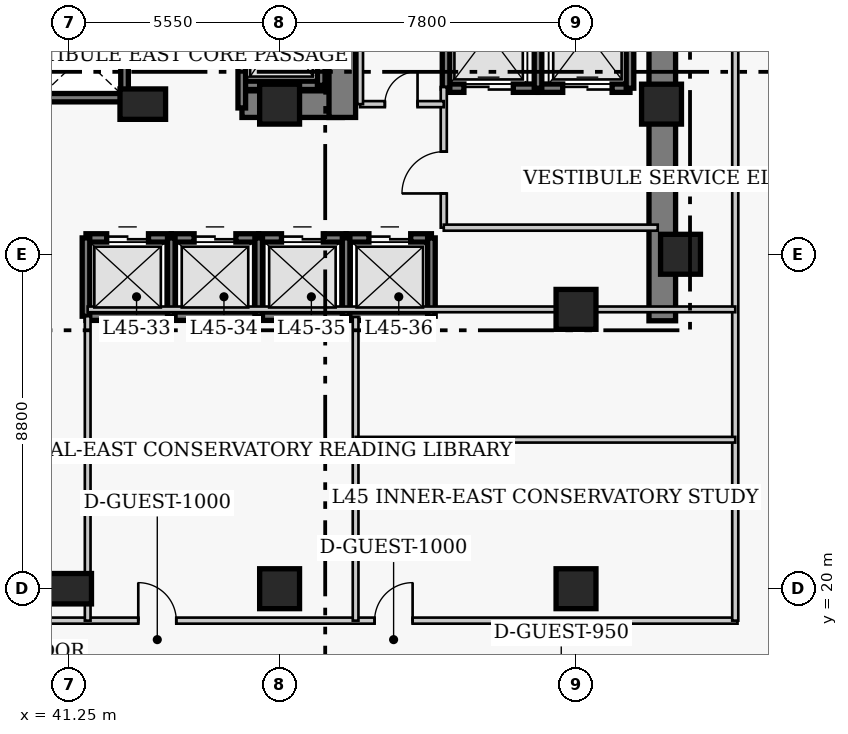
"""IFC4 building model, lengths in metres.
Left out: names, types, materials, properties, quantities, classifications, styles, units other than length and angle.
Written with IfcOpenShell. Run it as: python <this file> out.ifc"""

import sys

from ifc_helpers import new_model, si_unit, direction, frame, frame_2d, origin, origin_2d, place, context, subcontext, project, spatial, rectangle, extrude, element, fill, save


model = new_model("IFC4")
c1 = context("Model", 3, precision=1e-05, world=origin(), true_north=direction((0.0, 1.0)))
c2 = subcontext(c1, "Body", "Model", "MODEL_VIEW")
j1 = project(units=[si_unit("LENGTHUNIT", "METRE"), si_unit("PLANEANGLEUNIT", "RADIAN")], contexts=[c1])
p1 = place(None, origin())
s1 = spatial("IfcSite", under=j1, at=p1, CompositionType="ELEMENT")
p2 = place(p1, origin())
s2 = spatial("IfcBuilding", under=s1, at=p2, CompositionType="ELEMENT")
p3 = place(p2, frame((0.0, 0.0, 180.2)))
s3 = spatial("IfcBuildingStorey", under=s2, at=p3, CompositionType="ELEMENT", Elevation=180.2)
p4 = place(p3, frame((56.87, 27.05, 0.0), z_axis=(0.0, 0.0, 1.0), x_axis=(0.0, 1.0, 0.0)))
e1 = element("IfcWall", 1, at=p4, inside=s3, PredefinedType="SHEAR", context=c2, shape_type="SweptSolid", body=[
    extrude(rectangle(XDim=13.62, YDim=0.7, at=frame_2d((6.81, 0.0))), origin(), (0.0, 0.0, 1.0), 3.8),
])
p5 = place(p3, frame((45.81, 32.75, 0.0), z_axis=(0.0, 0.0, 1.0), x_axis=(1.0, 0.0, 0.0)))
e2 = element("IfcWall", 2, at=p5, inside=s3, PredefinedType="SHEAR", context=c2, shape_type="SweptSolid", body=[
    extrude(rectangle(XDim=2.64, YDim=0.7, at=frame_2d((1.32, 0.0))), origin(), (0.0, 0.0, 1.0), 3.8),
])
p6 = place(p3, frame((48.45, 32.4, 0.0), z_axis=(0.0, 0.0, 1.0), x_axis=(0.0, 1.0, 0.0)))
e3 = element("IfcWall", 3, at=p6, inside=s3, PredefinedType="SHEAR", context=c2, shape_type="SweptSolid", body=[
    extrude(rectangle(XDim=7.92, YDim=0.7, at=frame_2d((3.96, 0.0))), origin(), (0.0, 0.0, 1.0), 3.8),
])
p7 = place(p6, frame((5.8, 0.0, 0.0)))
e4 = element("IfcOpeningElement", 4, at=p7, cuts=e3, PredefinedType="OPENING", context=c2, shape_type="SweptSolid", body=[
    extrude(rectangle(XDim=1.1, YDim=2.15, at=frame_2d((0.55, 1.075))), frame((0.0, 0.36, 0.0), z_axis=(0.0, -1.0, 0.0), x_axis=(1.0, 0.0, 0.0)), (0.0, 0.0, 1.0), 0.72),
])
p8 = place(p3, frame((41.25, 20.0, 0.0), z_axis=(0.0, 0.0, 1.0), x_axis=(1.0, 0.0, 0.0)))
e5 = element("IfcColumn", 5, at=p8, inside=s3, PredefinedType="COLUMN", context=c2, shape_type="SweptSolid", body=[
    extrude(rectangle(XDim=1.2, YDim=0.8, at=origin_2d()), origin(), (0.0, 0.0, 1.0), 3.8),
])
for number, where, z_axis, x_axis in (
    (6, (46.8, 20.0, 0.0), (0.0, 0.0, 1.0), (1.0, 0.0, 0.0)),
    (7, (54.6, 20.0, 0.0), (0.0, 0.0, 1.0), (1.0, 0.0, 0.0)),
    (8, (57.35, 28.8, 0.0), (0.0, 0.0, 1.0), (1.0, 0.0, 0.0)),
):
    element("IfcColumn", number, at=place(p3, frame(where, z_axis=z_axis, x_axis=x_axis)), inside=s3, PredefinedType="COLUMN", context=c2, shape_type="SweptSolid", body=[
        extrude(rectangle(XDim=1.05, YDim=1.05, at=origin_2d()), origin(), (0.0, 0.0, 1.0), 3.8),
    ])
p9 = place(p3, frame((43.2, 32.75, 0.0), z_axis=(0.0, 0.0, 1.0), x_axis=(1.0, 0.0, 0.0)))
e9 = element("IfcColumn", 9, at=p9, inside=s3, PredefinedType="COLUMN", context=c2, shape_type="SweptSolid", body=[
    extrude(rectangle(XDim=1.2, YDim=0.8, at=origin_2d()), origin(), (0.0, 0.0, 1.0), 3.8),
])
for number, where, z_axis, x_axis in (
    (10, (46.8, 32.75, 0.0), (0.0, 0.0, 1.0), (1.0, 0.0, 0.0)),
    (11, (54.6, 27.35, 0.0), (0.0, 0.0, 1.0), (1.0, 0.0, 0.0)),
    (12, (56.85, 32.75, 0.0), (0.0, 0.0, 1.0), (1.0, 0.0, 0.0)),
):
    element("IfcColumn", number, at=place(p3, frame(where, z_axis=z_axis, x_axis=x_axis)), inside=s3, PredefinedType="COLUMN", context=c2, shape_type="SweptSolid", body=[
        extrude(rectangle(XDim=1.05, YDim=1.05, at=origin_2d()), origin(), (0.0, 0.0, 1.0), 3.8),
    ])
p10 = place(p3, frame((41.705, 29.23, 0.0), z_axis=(0.0, 0.0, 1.0), x_axis=(1.0, 0.0, 0.0)))
e13 = element("IfcWall", 13, at=p10, inside=s3, PredefinedType="SHEAR", context=c2, shape_type="SweptSolid", body=[
    extrude(rectangle(XDim=2.245, YDim=0.22, at=frame_2d((1.123, 0.0))), origin(), (0.0, 0.0, 1.0), 3.8),
])
p11 = place(p10, frame((0.545, 0.0, 0.0)))
e14 = element("IfcOpeningElement", 14, at=p11, cuts=e13, PredefinedType="OPENING", context=c2, shape_type="SweptSolid", body=[
    extrude(rectangle(XDim=1.1, YDim=2.15, at=frame_2d((0.55, 1.075))), frame((0.0, 0.12, 0.0), z_axis=(0.0, -1.0, 0.0), x_axis=(1.0, 0.0, 0.0)), (0.0, 0.0, 1.0), 0.24),
])
p12 = place(p3, frame((41.705, 27.17, 0.0), z_axis=(0.0, 0.0, 1.0), x_axis=(1.0, 0.0, 0.0)))
e15 = element("IfcWall", 15, at=p12, inside=s3, PredefinedType="SHEAR", context=c2, shape_type="SweptSolid", body=[
    extrude(rectangle(XDim=2.245, YDim=0.22, at=frame_2d((1.123, 0.0))), origin(), (0.0, 0.0, 1.0), 3.8),
])
p13 = place(p3, frame((41.705, 27.17, 0.0), z_axis=(0.0, 0.0, 1.0), x_axis=(0.0, 1.0, 0.0)))
e16 = element("IfcWall", 16, at=p13, inside=s3, PredefinedType="SHEAR", context=c2, shape_type="SweptSolid", body=[
    extrude(rectangle(XDim=2.06, YDim=0.2, at=frame_2d((1.03, 0.0))), origin(), (0.0, 0.0, 1.0), 3.8),
])
p14 = place(p3, frame((43.95, 29.23, 0.0), z_axis=(0.0, 0.0, 1.0), x_axis=(1.0, 0.0, 0.0)))
e17 = element("IfcWall", 17, at=p14, inside=s3, PredefinedType="SHEAR", context=c2, shape_type="SweptSolid", body=[
    extrude(rectangle(XDim=2.3, YDim=0.22, at=frame_2d((1.15, 0.0))), origin(), (0.0, 0.0, 1.0), 3.8),
])
p15 = place(p14, frame((0.6, 0.0, 0.0)))
e18 = element("IfcOpeningElement", 18, at=p15, cuts=e17, PredefinedType="OPENING", context=c2, shape_type="SweptSolid", body=[
    extrude(rectangle(XDim=1.1, YDim=2.15, at=frame_2d((0.55, 1.075))), frame((0.0, 0.12, 0.0), z_axis=(0.0, -1.0, 0.0), x_axis=(1.0, 0.0, 0.0)), (0.0, 0.0, 1.0), 0.24),
])
p16 = place(p3, frame((43.95, 27.17, 0.0), z_axis=(0.0, 0.0, 1.0), x_axis=(1.0, 0.0, 0.0)))
e19 = element("IfcWall", 19, at=p16, inside=s3, PredefinedType="SHEAR", context=c2, shape_type="SweptSolid", body=[
    extrude(rectangle(XDim=2.3, YDim=0.22, at=frame_2d((1.15, 0.0))), origin(), (0.0, 0.0, 1.0), 3.8),
])
p17 = place(p3, frame((43.95, 27.17, 0.0), z_axis=(0.0, 0.0, 1.0), x_axis=(0.0, 1.0, 0.0)))
e20 = element("IfcWall", 20, at=p17, inside=s3, PredefinedType="SHEAR", context=c2, shape_type="SweptSolid", body=[
    extrude(rectangle(XDim=2.06, YDim=0.2, at=frame_2d((1.03, 0.0))), origin(), (0.0, 0.0, 1.0), 3.8),
])
p18 = place(p3, frame((46.25, 29.23, 0.0), z_axis=(0.0, 0.0, 1.0), x_axis=(1.0, 0.0, 0.0)))
e21 = element("IfcWall", 21, at=p18, inside=s3, PredefinedType="SHEAR", context=c2, shape_type="SweptSolid", body=[
    extrude(rectangle(XDim=2.3, YDim=0.22, at=frame_2d((1.15, 0.0))), origin(), (0.0, 0.0, 1.0), 3.8),
])
p19 = place(p18, frame((0.6, 0.0, 0.0)))
e22 = element("IfcOpeningElement", 22, at=p19, cuts=e21, PredefinedType="OPENING", context=c2, shape_type="SweptSolid", body=[
    extrude(rectangle(XDim=1.1, YDim=2.15, at=frame_2d((0.55, 1.075))), frame((0.0, 0.12, 0.0), z_axis=(0.0, -1.0, 0.0), x_axis=(1.0, 0.0, 0.0)), (0.0, 0.0, 1.0), 0.24),
])
p20 = place(p3, frame((46.25, 27.17, 0.0), z_axis=(0.0, 0.0, 1.0), x_axis=(1.0, 0.0, 0.0)))
e23 = element("IfcWall", 23, at=p20, inside=s3, PredefinedType="SHEAR", context=c2, shape_type="SweptSolid", body=[
    extrude(rectangle(XDim=2.3, YDim=0.22, at=frame_2d((1.15, 0.0))), origin(), (0.0, 0.0, 1.0), 3.8),
])
p21 = place(p3, frame((46.25, 27.17, 0.0), z_axis=(0.0, 0.0, 1.0), x_axis=(0.0, 1.0, 0.0)))
e24 = element("IfcWall", 24, at=p21, inside=s3, PredefinedType="SHEAR", context=c2, shape_type="SweptSolid", body=[
    extrude(rectangle(XDim=2.06, YDim=0.2, at=frame_2d((1.03, 0.0))), origin(), (0.0, 0.0, 1.0), 3.8),
])
p22 = place(p3, frame((48.55, 29.23, 0.0), z_axis=(0.0, 0.0, 1.0), x_axis=(1.0, 0.0, 0.0)))
e25 = element("IfcWall", 25, at=p22, inside=s3, PredefinedType="SHEAR", context=c2, shape_type="SweptSolid", body=[
    extrude(rectangle(XDim=2.245, YDim=0.22, at=frame_2d((1.123, 0.0))), origin(), (0.0, 0.0, 1.0), 3.8),
])
p23 = place(p22, frame((0.6, 0.0, 0.0)))
e26 = element("IfcOpeningElement", 26, at=p23, cuts=e25, PredefinedType="OPENING", context=c2, shape_type="SweptSolid", body=[
    extrude(rectangle(XDim=1.1, YDim=2.15, at=frame_2d((0.55, 1.075))), frame((0.0, 0.12, 0.0), z_axis=(0.0, -1.0, 0.0), x_axis=(1.0, 0.0, 0.0)), (0.0, 0.0, 1.0), 0.24),
])
p24 = place(p3, frame((48.55, 27.17, 0.0), z_axis=(0.0, 0.0, 1.0), x_axis=(1.0, 0.0, 0.0)))
e27 = element("IfcWall", 27, at=p24, inside=s3, PredefinedType="SHEAR", context=c2, shape_type="SweptSolid", body=[
    extrude(rectangle(XDim=2.245, YDim=0.22, at=frame_2d((1.123, 0.0))), origin(), (0.0, 0.0, 1.0), 3.8),
])
for number, where, z_axis, x_axis in (
    (28, (48.55, 27.17, 0.0), (0.0, 0.0, 1.0), (0.0, 1.0, 0.0)),
    (29, (50.795, 27.17, 0.0), (0.0, 0.0, 1.0), (0.0, 1.0, 0.0)),
):
    element("IfcWall", number, at=place(p3, frame(where, z_axis=z_axis, x_axis=x_axis)), inside=s3, PredefinedType="SHEAR", context=c2, shape_type="SweptSolid", body=[
        extrude(rectangle(XDim=2.06, YDim=0.2, at=frame_2d((1.03, 0.0))), origin(), (0.0, 0.0, 1.0), 3.8),
    ])
p25 = place(p3, frame((40.4, 32.92, 0.0), z_axis=(0.0, 0.0, 1.0), x_axis=(1.0, 0.0, 0.0)))
e30 = element("IfcWall", 30, at=p25, inside=s3, PredefinedType="SHEAR", context=c2, shape_type="SweptSolid", body=[
    extrude(rectangle(XDim=2.32, YDim=0.22, at=frame_2d((1.16, 0.0))), origin(), (0.0, 0.0, 1.0), 3.8),
])
p26 = place(p3, frame((42.72, 32.92, 0.0), z_axis=(0.0, 0.0, 1.0), x_axis=(0.0, 1.0, 0.0)))
e31 = element("IfcWall", 31, at=p26, inside=s3, PredefinedType="SHEAR", context=c2, shape_type="SweptSolid", body=[
    extrude(rectangle(XDim=2.16, YDim=0.2, at=frame_2d((1.08, 0.0))), origin(), (0.0, 0.0, 1.0), 3.8),
])
p27 = place(p3, frame((51.18, 33.17, 0.0), z_axis=(0.0, 0.0, 1.0), x_axis=(1.0, 0.0, 0.0)))
e32 = element("IfcWall", 32, at=p27, inside=s3, PredefinedType="SHEAR", context=c2, shape_type="SweptSolid", body=[
    extrude(rectangle(XDim=2.42, YDim=0.22, at=frame_2d((1.21, 0.0))), origin(), (0.0, 0.0, 1.0), 3.8),
])
p28 = place(p27, frame((0.47, 0.0, 0.0)))
e33 = element("IfcOpeningElement", 33, at=p28, cuts=e32, PredefinedType="OPENING", context=c2, shape_type="SweptSolid", body=[
    extrude(rectangle(XDim=1.3, YDim=2.15, at=frame_2d((0.65, 1.075))), frame((0.0, 0.12, 0.0), z_axis=(0.0, -1.0, 0.0), x_axis=(1.0, 0.0, 0.0)), (0.0, 0.0, 1.0), 0.24),
])
p29 = place(p3, frame((51.18, 33.17, 0.0), z_axis=(0.0, 0.0, 1.0), x_axis=(0.0, 1.0, 0.0)))
e34 = element("IfcWall", 34, at=p29, inside=s3, PredefinedType="SHEAR", context=c2, shape_type="SweptSolid", body=[
    extrude(rectangle(XDim=2.86, YDim=0.2, at=frame_2d((1.43, 0.0))), origin(), (0.0, 0.0, 1.0), 3.8),
])
p30 = place(p3, frame((53.6, 33.17, 0.0), z_axis=(0.0, 0.0, 1.0), x_axis=(1.0, 0.0, 0.0)))
e35 = element("IfcWall", 35, at=p30, inside=s3, PredefinedType="SHEAR", context=c2, shape_type="SweptSolid", body=[
    extrude(rectangle(XDim=2.42, YDim=0.22, at=frame_2d((1.21, 0.0))), origin(), (0.0, 0.0, 1.0), 3.8),
])
p31 = place(p30, frame((0.65, 0.0, 0.0)))
e36 = element("IfcOpeningElement", 36, at=p31, cuts=e35, PredefinedType="OPENING", context=c2, shape_type="SweptSolid", body=[
    extrude(rectangle(XDim=1.3, YDim=2.15, at=frame_2d((0.65, 1.075))), frame((0.0, 0.12, 0.0), z_axis=(0.0, -1.0, 0.0), x_axis=(1.0, 0.0, 0.0)), (0.0, 0.0, 1.0), 0.24),
])
for number, where, z_axis, x_axis in (
    (37, (53.6, 33.17, 0.0), (0.0, 0.0, 1.0), (0.0, 1.0, 0.0)),
    (38, (56.02, 33.17, 0.0), (0.0, 0.0, 1.0), (0.0, 1.0, 0.0)),
):
    element("IfcWall", number, at=place(p3, frame(where, z_axis=z_axis, x_axis=x_axis)), inside=s3, PredefinedType="SHEAR", context=c2, shape_type="SweptSolid", body=[
        extrude(rectangle(XDim=2.86, YDim=0.2, at=frame_2d((1.43, 0.0))), origin(), (0.0, 0.0, 1.0), 3.8),
    ])
p32 = place(p3, frame((45.805, 33.245, 0.0), z_axis=(0.0, 0.0, 1.0), x_axis=(1.0, 0.0, 0.0)))
e39 = element("IfcWall", 39, at=p32, inside=s3, PredefinedType="SHEAR", context=c2, shape_type="SweptSolid", body=[
    extrude(rectangle(XDim=2.09, YDim=0.22, at=frame_2d((1.045, 0.0))), origin(), (0.0, 0.0, 1.0), 3.8),
])
p33 = place(p3, frame((45.805, 32.65, 0.0), z_axis=(0.0, 0.0, 1.0), x_axis=(0.0, 1.0, 0.0)))
e40 = element("IfcWall", 40, at=p33, inside=s3, PredefinedType="SHEAR", context=c2, shape_type="SweptSolid", body=[
    extrude(rectangle(XDim=3.505, YDim=0.2, at=frame_2d((1.752, 0.0))), origin(), (0.0, 0.0, 1.0), 3.8),
])
p34 = place(p3, frame((47.895, 33.245, 0.0), z_axis=(0.0, 0.0, 1.0), x_axis=(0.0, 1.0, 0.0)))
e41 = element("IfcWall", 41, at=p34, inside=s3, PredefinedType="SHEAR", context=c2, shape_type="SweptSolid", body=[
    extrude(rectangle(XDim=2.91, YDim=0.2, at=frame_2d((1.455, 0.0))), origin(), (0.0, 0.0, 1.0), 3.8),
])
p35 = place(p3, frame((51.12, 29.5, 0.0), z_axis=(0.0, 0.0, 1.0), x_axis=(0.0, 1.0, 0.0)))
e42 = element("IfcWall", 42, at=p35, inside=s3, PredefinedType="PARTITIONING", context=c2, shape_type="SweptSolid", body=[
    extrude(rectangle(XDim=3.7, YDim=0.16, at=frame_2d((1.85, 0.0))), origin(), (0.0, 0.0, 1.0), 3.42),
])
p36 = place(p35, frame((0.9, 0.0, 0.0)))
e43 = element("IfcOpeningElement", 43, at=p36, cuts=e42, PredefinedType="OPENING", context=c2, shape_type="SweptSolid", body=[
    extrude(rectangle(XDim=1.1, YDim=2.15, at=frame_2d((0.55, 1.075))), frame((0.0, 0.09, 0.0), z_axis=(0.0, -1.0, 0.0), x_axis=(1.0, 0.0, 0.0)), (0.0, 0.0, 1.0), 0.18),
])
p37 = place(p3, frame((51.12, 29.5, 0.0), z_axis=(0.0, 0.0, 1.0), x_axis=(1.0, 0.0, 0.0)))
e44 = element("IfcWall", 44, at=p37, inside=s3, PredefinedType="PARTITIONING", context=c2, shape_type="SweptSolid", body=[
    extrude(rectangle(XDim=5.63, YDim=0.16, at=frame_2d((2.815, 0.0))), origin(), (0.0, 0.0, 1.0), 3.42),
])
p38 = place(p3, frame((48.92, 32.75, 0.0), z_axis=(0.0, 0.0, 1.0), x_axis=(1.0, 0.0, 0.0)))
e45 = element("IfcWall", 45, at=p38, inside=s3, PredefinedType="PARTITIONING", context=c2, shape_type="SweptSolid", body=[
    extrude(rectangle(XDim=2.2, YDim=0.16, at=frame_2d((1.1, 0.0))), origin(), (0.0, 0.0, 1.0), 3.42),
])
p39 = place(p38, frame((0.65, 0.0, 0.0)))
e46 = element("IfcOpeningElement", 46, at=p39, cuts=e45, PredefinedType="OPENING", context=c2, shape_type="SweptSolid", body=[
    extrude(rectangle(XDim=0.86, YDim=2.05, at=frame_2d((0.43, 1.025))), frame((0.0, 0.09, 0.0), z_axis=(0.0, -1.0, 0.0), x_axis=(1.0, 0.0, 0.0)), (0.0, 0.0, 1.0), 0.18),
])
p40 = place(p3, frame((48.92, 32.75, 0.0), z_axis=(0.0, 0.0, 1.0), x_axis=(0.0, 1.0, 0.0)))
e47 = element("IfcWall", 47, at=p40, inside=s3, PredefinedType="PARTITIONING", context=c2, shape_type="SweptSolid", body=[
    extrude(rectangle(XDim=3.62, YDim=0.15, at=frame_2d((1.81, 0.0))), origin(), (0.0, 0.0, 1.0), 3.42),
])
p41 = place(p3, frame((35.85, 19.16, 0.0), z_axis=(0.0, 0.0, 1.0), x_axis=(1.0, 0.0, 0.0)))
e48 = element("IfcWall", 48, at=p41, inside=s3, PredefinedType="PARTITIONING", context=c2, shape_type="SweptSolid", body=[
    extrude(rectangle(XDim=23.0, YDim=0.16, at=frame_2d((11.5, 0.0))), origin(), (0.0, 0.0, 1.0), 3.42),
])
p42 = place(p41, frame((7.231, 0.0, 0.0)))
e49 = element("IfcOpeningElement", 49, at=p42, cuts=e48, PredefinedType="OPENING", context=c2, shape_type="SweptSolid", body=[
    extrude(rectangle(XDim=1.0, YDim=2.15, at=frame_2d((0.5, 1.075))), frame((0.0, 0.09, 0.0), z_axis=(0.0, -1.0, 0.0), x_axis=(1.0, 0.0, 0.0)), (0.0, 0.0, 1.0), 0.18),
])
p43 = place(p41, frame((13.45, 0.0, 0.0)))
e50 = element("IfcOpeningElement", 50, at=p43, cuts=e48, PredefinedType="OPENING", context=c2, shape_type="SweptSolid", body=[
    extrude(rectangle(XDim=1.0, YDim=2.15, at=frame_2d((0.5, 1.075))), frame((0.0, 0.09, 0.0), z_axis=(0.0, -1.0, 0.0), x_axis=(1.0, 0.0, 0.0)), (0.0, 0.0, 1.0), 0.18),
])
p44 = place(p3, frame((58.79, 19.16, 0.0), z_axis=(0.0, 0.0, 1.0), x_axis=(0.0, 1.0, 0.0)))
e51 = element("IfcWall", 51, at=p44, inside=s3, PredefinedType="PARTITIONING", context=c2, shape_type="SweptSolid", body=[
    extrude(rectangle(XDim=21.49, YDim=0.16, at=frame_2d((10.745, 0.0))), origin(), (0.0, 0.0, 1.0), 3.42),
])
p45 = place(p3, frame((41.75, 19.16, 0.0), z_axis=(0.0, 0.0, 1.0), x_axis=(0.0, 1.0, 0.0)))
e52 = element("IfcWall", 52, at=p45, inside=s3, PredefinedType="PARTITIONING", context=c2, shape_type="SweptSolid", body=[
    extrude(rectangle(XDim=8.01, YDim=0.15, at=frame_2d((4.005, 0.0))), origin(), (0.0, 0.0, 1.0), 3.42),
])
p46 = place(p3, frame((48.8, 19.16, 0.0), z_axis=(0.0, 0.0, 1.0), x_axis=(0.0, 1.0, 0.0)))
e53 = element("IfcWall", 53, at=p46, inside=s3, PredefinedType="PARTITIONING", context=c2, shape_type="SweptSolid", body=[
    extrude(rectangle(XDim=7.99, YDim=0.15, at=frame_2d((3.995, 0.0))), origin(), (0.0, 0.0, 1.0), 3.42),
])
p47 = place(p3, frame((41.75, 27.35, 0.0), z_axis=(0.0, 0.0, 1.0), x_axis=(1.0, 0.0, 0.0)))
e54 = element("IfcWall", 54, at=p47, inside=s3, PredefinedType="PARTITIONING", context=c2, shape_type="SweptSolid", body=[
    extrude(rectangle(XDim=17.04, YDim=0.15, at=frame_2d((8.52, 0.0))), origin(), (0.0, 0.0, 1.0), 3.42),
])
p48 = place(p3, frame((48.8, 23.92, 0.0), z_axis=(0.0, 0.0, 1.0), x_axis=(1.0, 0.0, 0.0)))
e55 = element("IfcWall", 55, at=p48, inside=s3, PredefinedType="PARTITIONING", context=c2, shape_type="SweptSolid", body=[
    extrude(rectangle(XDim=9.99, YDim=0.15, at=frame_2d((4.995, 0.0))), origin(), (0.0, 0.0, 1.0), 3.42),
])
p49 = place(p11, origin())
e56 = element("IfcDoor", 56, at=p49, inside=s3, OperationType="DOUBLE_DOOR_SLIDING", PredefinedType="DOOR", context=c2, shape_type="SweptSolid", body=[
    extrude(rectangle(XDim=1.1, YDim=2.15, at=frame_2d((0.55, 1.075))), frame((0.0, 0.025, 0.0), z_axis=(0.0, -1.0, 0.0), x_axis=(1.0, 0.0, 0.0)), (0.0, 0.0, 1.0), 0.05),
])
fill(e14, e56)
p50 = place(p15, origin())
e57 = element("IfcDoor", 57, at=p50, inside=s3, OperationType="DOUBLE_DOOR_SLIDING", PredefinedType="DOOR", context=c2, shape_type="SweptSolid", body=[
    extrude(rectangle(XDim=1.1, YDim=2.15, at=frame_2d((0.55, 1.075))), frame((0.0, 0.025, 0.0), z_axis=(0.0, -1.0, 0.0), x_axis=(1.0, 0.0, 0.0)), (0.0, 0.0, 1.0), 0.05),
])
fill(e18, e57)
p51 = place(p19, origin())
e58 = element("IfcDoor", 58, at=p51, inside=s3, OperationType="DOUBLE_DOOR_SLIDING", PredefinedType="DOOR", context=c2, shape_type="SweptSolid", body=[
    extrude(rectangle(XDim=1.1, YDim=2.15, at=frame_2d((0.55, 1.075))), frame((0.0, 0.025, 0.0), z_axis=(0.0, -1.0, 0.0), x_axis=(1.0, 0.0, 0.0)), (0.0, 0.0, 1.0), 0.05),
])
fill(e22, e58)
p52 = place(p23, origin())
e59 = element("IfcDoor", 59, at=p52, inside=s3, OperationType="DOUBLE_DOOR_SLIDING", PredefinedType="DOOR", context=c2, shape_type="SweptSolid", body=[
    extrude(rectangle(XDim=1.1, YDim=2.15, at=frame_2d((0.55, 1.075))), frame((0.0, 0.025, 0.0), z_axis=(0.0, -1.0, 0.0), x_axis=(1.0, 0.0, 0.0)), (0.0, 0.0, 1.0), 0.05),
])
fill(e26, e59)
p53 = place(p28, origin())
e60 = element("IfcDoor", 60, at=p53, inside=s3, OperationType="DOUBLE_DOOR_SLIDING", PredefinedType="DOOR", context=c2, shape_type="SweptSolid", body=[
    extrude(rectangle(XDim=1.3, YDim=2.15, at=frame_2d((0.65, 1.075))), frame((0.0, 0.025, 0.0), z_axis=(0.0, -1.0, 0.0), x_axis=(1.0, 0.0, 0.0)), (0.0, 0.0, 1.0), 0.05),
])
fill(e33, e60)
p54 = place(p31, origin())
e61 = element("IfcDoor", 61, at=p54, inside=s3, OperationType="DOUBLE_DOOR_SLIDING", PredefinedType="DOOR", context=c2, shape_type="SweptSolid", body=[
    extrude(rectangle(XDim=1.3, YDim=2.15, at=frame_2d((0.65, 1.075))), frame((0.0, 0.025, 0.0), z_axis=(0.0, -1.0, 0.0), x_axis=(1.0, 0.0, 0.0)), (0.0, 0.0, 1.0), 0.05),
])
fill(e36, e61)
p55 = place(p36, origin())
e62 = element("IfcDoor", 62, at=p55, inside=s3, OperationType="SINGLE_SWING_LEFT", PredefinedType="DOOR", context=c2, shape_type="SweptSolid", body=[
    extrude(rectangle(XDim=1.1, YDim=2.15, at=frame_2d((0.55, 1.075))), frame((0.0, 0.025, 0.0), z_axis=(0.0, -1.0, 0.0), x_axis=(1.0, 0.0, 0.0)), (0.0, 0.0, 1.0), 0.05),
])
fill(e43, e62)
p56 = place(p39, origin())
e63 = element("IfcDoor", 63, at=p56, inside=s3, OperationType="SINGLE_SWING_RIGHT", PredefinedType="DOOR", context=c2, shape_type="SweptSolid", body=[
    extrude(rectangle(XDim=0.86, YDim=2.05, at=frame_2d((0.43, 1.025))), frame((0.0, 0.025, 0.0), z_axis=(0.0, -1.0, 0.0), x_axis=(1.0, 0.0, 0.0)), (0.0, 0.0, 1.0), 0.05),
])
fill(e46, e63)
p57 = place(p42, origin())
e64 = element("IfcDoor", 64, at=p57, inside=s3, OperationType="SINGLE_SWING_LEFT", PredefinedType="DOOR", context=c2, shape_type="SweptSolid", body=[
    extrude(rectangle(XDim=1.0, YDim=2.15, at=frame_2d((0.5, 1.075))), frame((0.0, 0.025, 0.0), z_axis=(0.0, -1.0, 0.0), x_axis=(1.0, 0.0, 0.0)), (0.0, 0.0, 1.0), 0.05),
])
fill(e49, e64)
p58 = place(p43, origin())
e65 = element("IfcDoor", 65, at=p58, inside=s3, OperationType="SINGLE_SWING_RIGHT", PredefinedType="DOOR", context=c2, shape_type="SweptSolid", body=[
    extrude(rectangle(XDim=1.0, YDim=2.15, at=frame_2d((0.5, 1.075))), frame((0.0, 0.025, 0.0), z_axis=(0.0, -1.0, 0.0), x_axis=(1.0, 0.0, 0.0)), (0.0, 0.0, 1.0), 0.05),
])
fill(e50, e65)
save(model, sys.argv[1])
